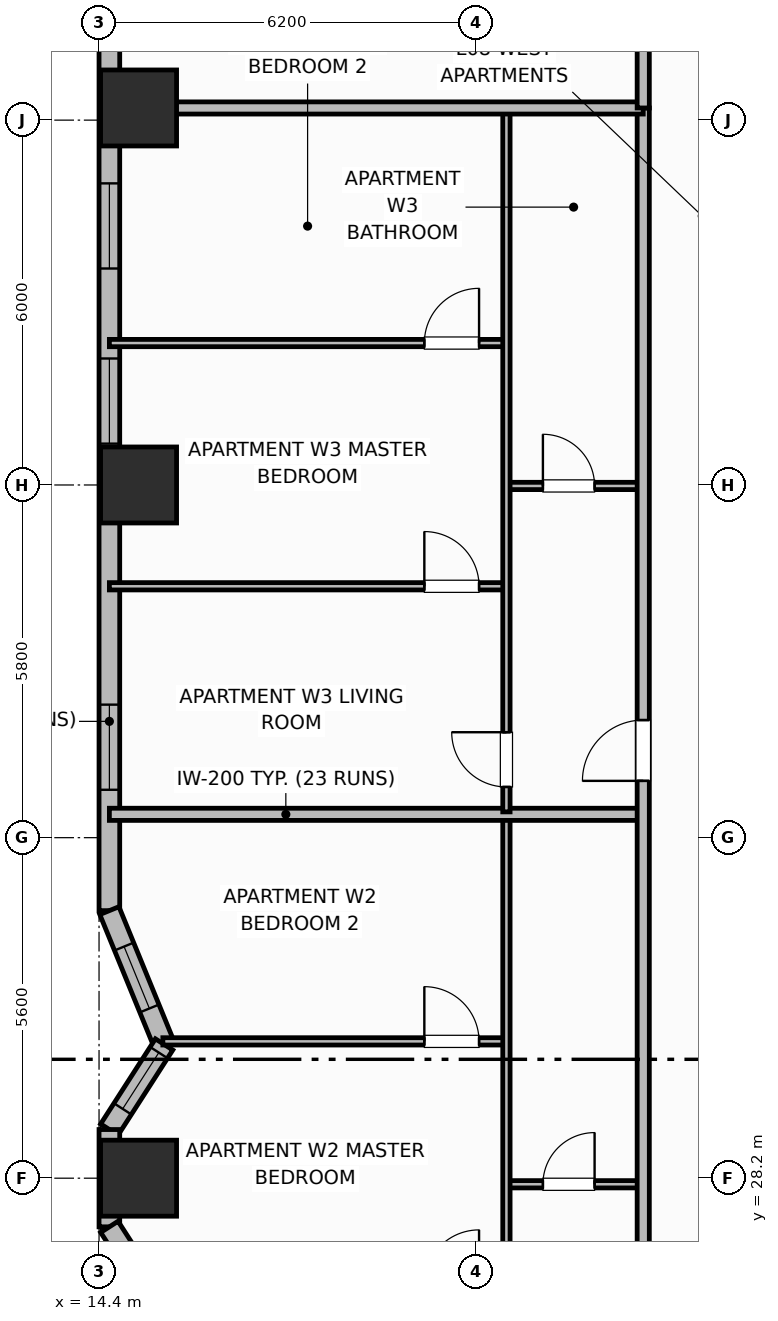
"""IFC4 building model, lengths in metres.
Left out: names, types, materials, properties, quantities, classifications, styles, units other than length and angle.
Written with IfcOpenShell. Run it as: python <this file> out.ifc"""

import sys

from ifc_helpers import new_model, si_unit, direction, frame, frame_2d, origin, origin_2d, place, context, subcontext, project, spatial, rectangle, extrude, element, fill, save


model = new_model("IFC4")
c1 = context("Model", 3, precision=1e-05, world=origin(), true_north=direction((0.0, 1.0)))
c2 = subcontext(c1, "Body", "Model", "MODEL_VIEW")
j1 = project(units=[si_unit("LENGTHUNIT", "METRE"), si_unit("PLANEANGLEUNIT", "RADIAN")], contexts=[c1])
p1 = place(None, origin())
s1 = spatial("IfcSite", under=j1, at=p1, CompositionType="ELEMENT")
p2 = place(p1, origin())
s2 = spatial("IfcBuilding", under=s1, at=p2, CompositionType="ELEMENT")
p3 = place(p2, frame((0.0, 0.0, 36.2)))
s3 = spatial("IfcBuildingStorey", under=s2, at=p3, CompositionType="ELEMENT", Elevation=36.2)
for number, where, z_axis, x_axis in (
    (1, (15.05, 28.2, 0.0), (0.0, 0.0, 1.0), (1.0, 0.0, 0.0)),
    (2, (15.05, 39.6, 0.0), (0.0, 0.0, 1.0), (1.0, 0.0, 0.0)),
    (3, (15.05, 45.8, 0.0), (0.0, 0.0, 1.0), (1.0, 0.0, 0.0)),
):
    element("IfcColumn", number, at=place(p3, frame(where, z_axis=z_axis, x_axis=x_axis)), inside=s3, PredefinedType="COLUMN", context=c2, shape_type="SweptSolid", body=[
        extrude(rectangle(XDim=1.25, YDim=1.25, at=origin_2d()), origin(), (0.0, 0.0, 1.0), 3.7),
    ])
p4 = place(p3, frame((14.57, 47.4, 0.0), z_axis=(0.0, 0.0, 1.0), x_axis=(0.0, -1.0, 0.0)))
e4 = element("IfcWall", 4, at=p4, inside=s3, PredefinedType="SOLIDWALL", context=c2, shape_type="SweptSolid", body=[
    extrude(rectangle(XDim=14.8, YDim=0.34, at=frame_2d((7.4, 0.0))), origin(), (0.0, 0.0, 1.0), 2.7),
])
p5 = place(p4, frame((2.84, 0.0, 0.69)))
e5 = element("IfcOpeningElement", 5, at=p5, cuts=e4, PredefinedType="OPENING", context=c2, shape_type="SweptSolid", body=[
    extrude(rectangle(XDim=1.4, YDim=1.85, at=frame_2d((0.7, 0.925))), frame((0.0, 0.18, 0.0), z_axis=(0.0, -1.0, 0.0), x_axis=(1.0, 0.0, 0.0)), (0.0, 0.0, 1.0), 0.36),
])
p6 = place(p4, frame((5.72, 0.0, 0.69)))
e6 = element("IfcOpeningElement", 6, at=p6, cuts=e4, PredefinedType="OPENING", context=c2, shape_type="SweptSolid", body=[
    extrude(rectangle(XDim=1.4, YDim=1.85, at=frame_2d((0.7, 0.925))), frame((0.0, 0.18, 0.0), z_axis=(0.0, -1.0, 0.0), x_axis=(1.0, 0.0, 0.0)), (0.0, 0.0, 1.0), 0.36),
])
p7 = place(p4, frame((11.413, 0.0, 0.73)))
e7 = element("IfcOpeningElement", 7, at=p7, cuts=e4, PredefinedType="OPENING", context=c2, shape_type="SweptSolid", body=[
    extrude(rectangle(XDim=1.4, YDim=1.85, at=frame_2d((0.7, 0.925))), frame((0.0, 0.18, 0.0), z_axis=(0.0, -1.0, 0.0), x_axis=(1.0, 0.0, 0.0)), (0.0, 0.0, 1.0), 0.36),
])
p8 = place(p3, frame((14.57, 32.6, 0.0), z_axis=(0.0, 0.0, 1.0), x_axis=(0.378568858991, -0.925573130013, 0.0)))
e8 = element("IfcWall", 8, at=p8, inside=s3, PredefinedType="SOLIDWALL", context=c2, shape_type="SweptSolid", body=[
    extrude(rectangle(XDim=2.377, YDim=0.34, at=frame_2d((1.188, 0.0))), origin(), (0.0, 0.0, 1.0), 2.7),
])
p9 = place(p8, frame((0.638, 0.0, 0.89)))
e9 = element("IfcOpeningElement", 9, at=p9, cuts=e8, PredefinedType="OPENING", context=c2, shape_type="SweptSolid", body=[
    extrude(rectangle(XDim=1.1, YDim=1.65, at=frame_2d((0.55, 0.825))), frame((0.0, 0.18, 0.0), z_axis=(0.0, -1.0, 0.0), x_axis=(1.0, 0.0, 0.0)), (0.0, 0.0, 1.0), 0.36),
])
p10 = place(p3, frame((15.47, 30.4, 0.0), z_axis=(0.0, 0.0, 1.0), x_axis=(-0.540742762169, -0.841188008214, 0.0)))
e10 = element("IfcWall", 10, at=p10, inside=s3, PredefinedType="SOLIDWALL", context=c2, shape_type="SweptSolid", body=[
    extrude(rectangle(XDim=1.664, YDim=0.34, at=frame_2d((0.832, 0.0))), origin(), (0.0, 0.0, 1.0), 2.7),
])
p11 = place(p10, frame((0.16, 0.0, 0.89)))
e11 = element("IfcOpeningElement", 11, at=p11, cuts=e10, PredefinedType="OPENING", context=c2, shape_type="SweptSolid", body=[
    extrude(rectangle(XDim=1.1, YDim=1.65, at=frame_2d((0.55, 0.825))), frame((0.0, 0.18, 0.0), z_axis=(0.0, -1.0, 0.0), x_axis=(1.0, 0.0, 0.0)), (0.0, 0.0, 1.0), 0.36),
])
p12 = place(p3, frame((14.57, 29.0, 0.0), z_axis=(0.0, 0.0, 1.0), x_axis=(0.0, -1.0, 0.0)))
e12 = element("IfcWall", 12, at=p12, inside=s3, PredefinedType="SOLIDWALL", context=c2, shape_type="SweptSolid", body=[
    extrude(rectangle(XDim=1.6, YDim=0.34, at=frame_2d((0.8, 0.0))), origin(), (0.0, 0.0, 1.0), 2.7),
])
p13 = place(p3, frame((14.57, 27.4, 0.0), z_axis=(0.0, 0.0, 1.0), x_axis=(0.540742762169, -0.841188008214, 0.0)))
e13 = element("IfcWall", 13, at=p13, inside=s3, PredefinedType="SOLIDWALL", context=c2, shape_type="SweptSolid", body=[
    extrude(rectangle(XDim=1.664, YDim=0.34, at=frame_2d((0.832, 0.0))), origin(), (0.0, 0.0, 1.0), 2.7),
])
p14 = place(p3, frame((21.1, 28.1, 0.0), z_axis=(0.0, 0.0, 1.0), x_axis=(1.0, 0.0, 0.0)))
e14 = element("IfcWall", 14, at=p14, inside=s3, PredefinedType="PARTITIONING", context=c2, shape_type="SweptSolid", body=[
    extrude(rectangle(XDim=2.25, YDim=0.12, at=frame_2d((1.125, 0.0))), origin(), (0.0, 0.0, 1.0), 2.53),
])
p15 = place(p14, frame((0.6, 0.0, 0.0)))
e15 = element("IfcOpeningElement", 15, at=p15, cuts=e14, PredefinedType="OPENING", context=c2, shape_type="SweptSolid", body=[
    extrude(rectangle(XDim=0.85, YDim=2.1, at=frame_2d((0.425, 1.05))), frame((0.0, 0.07, 0.0), z_axis=(0.0, -1.0, 0.0), x_axis=(1.0, 0.0, 0.0)), (0.0, 0.0, 1.0), 0.14),
])
p16 = place(p3, frame((15.449, 30.45, 0.0), z_axis=(0.0, 0.0, 1.0), x_axis=(1.0, 0.0, 0.0)))
e16 = element("IfcWall", 16, at=p16, inside=s3, PredefinedType="PARTITIONING", context=c2, shape_type="SweptSolid", body=[
    extrude(rectangle(XDim=5.651, YDim=0.12, at=frame_2d((2.825, 0.0))), origin(), (0.0, 0.0, 1.0), 2.53),
])
p17 = place(p16, frame((4.301, 0.0, 0.0)))
e17 = element("IfcOpeningElement", 17, at=p17, cuts=e16, PredefinedType="OPENING", context=c2, shape_type="SweptSolid", body=[
    extrude(rectangle(XDim=0.9, YDim=2.1, at=frame_2d((0.45, 1.05))), frame((0.0, 0.07, 0.0), z_axis=(0.0, -1.0, 0.0), x_axis=(1.0, 0.0, 0.0)), (0.0, 0.0, 1.0), 0.14),
])
p18 = place(p3, frame((21.1, 22.74, 0.0), z_axis=(0.0, 0.0, 1.0), x_axis=(0.0, 1.0, 0.0)))
e18 = element("IfcWall", 18, at=p18, inside=s3, PredefinedType="PARTITIONING", context=c2, shape_type="SweptSolid", body=[
    extrude(rectangle(XDim=11.404, YDim=0.12, at=frame_2d((5.702, 0.0))), origin(), (0.0, 0.0, 1.0), 2.53),
])
p19 = place(p18, frame((0.41, 0.0, 0.0)))
e19 = element("IfcOpeningElement", 19, at=p19, cuts=e18, PredefinedType="OPENING", context=c2, shape_type="SweptSolid", body=[
    extrude(rectangle(XDim=0.9, YDim=2.1, at=frame_2d((0.45, 1.05))), frame((0.0, 0.07, 0.0), z_axis=(0.0, -1.0, 0.0), x_axis=(1.0, 0.0, 0.0)), (0.0, 0.0, 1.0), 0.14),
])
p20 = place(p3, frame((14.57, 34.184, 0.0), z_axis=(0.0, 0.0, 1.0), x_axis=(1.0, 0.0, 0.0)))
e20 = element("IfcWall", 20, at=p20, inside=s3, PredefinedType="PARTITIONING", context=c2, shape_type="SweptSolid", body=[
    extrude(rectangle(XDim=8.78, YDim=0.2, at=frame_2d((4.39, 0.0))), origin(), (0.0, 0.0, 1.0), 2.53),
])
p21 = place(p3, frame((21.1, 39.584, 0.0), z_axis=(0.0, 0.0, 1.0), x_axis=(1.0, 0.0, 0.0)))
e21 = element("IfcWall", 21, at=p21, inside=s3, PredefinedType="PARTITIONING", context=c2, shape_type="SweptSolid", body=[
    extrude(rectangle(XDim=2.25, YDim=0.12, at=frame_2d((1.125, 0.0))), origin(), (0.0, 0.0, 1.0), 2.53),
])
p22 = place(p21, frame((0.6, 0.0, 0.0)))
e22 = element("IfcOpeningElement", 22, at=p22, cuts=e21, PredefinedType="OPENING", context=c2, shape_type="SweptSolid", body=[
    extrude(rectangle(XDim=0.85, YDim=2.1, at=frame_2d((0.425, 1.05))), frame((0.0, 0.07, 0.0), z_axis=(0.0, -1.0, 0.0), x_axis=(1.0, 0.0, 0.0)), (0.0, 0.0, 1.0), 0.14),
])
p23 = place(p3, frame((14.57, 37.934, 0.0), z_axis=(0.0, 0.0, 1.0), x_axis=(1.0, 0.0, 0.0)))
e23 = element("IfcWall", 23, at=p23, inside=s3, PredefinedType="PARTITIONING", context=c2, shape_type="SweptSolid", body=[
    extrude(rectangle(XDim=6.53, YDim=0.12, at=frame_2d((3.265, 0.0))), origin(), (0.0, 0.0, 1.0), 2.53),
])
p24 = place(p23, frame((5.18, 0.0, 0.0)))
e24 = element("IfcOpeningElement", 24, at=p24, cuts=e23, PredefinedType="OPENING", context=c2, shape_type="SweptSolid", body=[
    extrude(rectangle(XDim=0.9, YDim=2.1, at=frame_2d((0.45, 1.05))), frame((0.0, 0.07, 0.0), z_axis=(0.0, -1.0, 0.0), x_axis=(1.0, 0.0, 0.0)), (0.0, 0.0, 1.0), 0.14),
])
p25 = place(p3, frame((14.57, 41.934, 0.0), z_axis=(0.0, 0.0, 1.0), x_axis=(1.0, 0.0, 0.0)))
e25 = element("IfcWall", 25, at=p25, inside=s3, PredefinedType="PARTITIONING", context=c2, shape_type="SweptSolid", body=[
    extrude(rectangle(XDim=6.53, YDim=0.12, at=frame_2d((3.265, 0.0))), origin(), (0.0, 0.0, 1.0), 2.53),
])
p26 = place(p25, frame((5.18, 0.0, 0.0)))
e26 = element("IfcOpeningElement", 26, at=p26, cuts=e25, PredefinedType="OPENING", context=c2, shape_type="SweptSolid", body=[
    extrude(rectangle(XDim=0.9, YDim=2.1, at=frame_2d((0.45, 1.05))), frame((0.0, 0.07, 0.0), z_axis=(0.0, -1.0, 0.0), x_axis=(1.0, 0.0, 0.0)), (0.0, 0.0, 1.0), 0.14),
])
p27 = place(p3, frame((21.1, 34.224, 0.0), z_axis=(0.0, 0.0, 1.0), x_axis=(0.0, 1.0, 0.0)))
e27 = element("IfcWall", 27, at=p27, inside=s3, PredefinedType="PARTITIONING", context=c2, shape_type="SweptSolid", body=[
    extrude(rectangle(XDim=11.536, YDim=0.12, at=frame_2d((5.768, 0.0))), origin(), (0.0, 0.0, 1.0), 2.53),
])
p28 = place(p27, frame((0.41, 0.0, 0.0)))
e28 = element("IfcOpeningElement", 28, at=p28, cuts=e27, PredefinedType="OPENING", context=c2, shape_type="SweptSolid", body=[
    extrude(rectangle(XDim=0.9, YDim=2.1, at=frame_2d((0.45, 1.05))), frame((0.0, 0.07, 0.0), z_axis=(0.0, -1.0, 0.0), x_axis=(1.0, 0.0, 0.0)), (0.0, 0.0, 1.0), 0.14),
])
p29 = place(p3, frame((23.35, 10.6, 0.0), z_axis=(0.0, 0.0, 1.0), x_axis=(0.0, 1.0, 0.0)))
e29 = element("IfcWall", 29, at=p29, inside=s3, PredefinedType="PARTITIONING", context=c2, shape_type="SweptSolid", body=[
    extrude(rectangle(XDim=35.2, YDim=0.2, at=frame_2d((17.6, 0.0))), origin(), (0.0, 0.0, 1.0), 2.53),
])
p30 = place(p29, frame((2.65, 0.0, 0.0)))
e30 = element("IfcOpeningElement", 30, at=p30, cuts=e29, PredefinedType="OPENING", context=c2, shape_type="SweptSolid", body=[
    extrude(rectangle(XDim=1.0, YDim=2.15, at=frame_2d((0.5, 1.075))), frame((0.0, 0.11, 0.0), z_axis=(0.0, -1.0, 0.0), x_axis=(1.0, 0.0, 0.0)), (0.0, 0.0, 1.0), 0.22),
])
p31 = place(p29, frame((12.65, 0.0, 0.0)))
e31 = element("IfcOpeningElement", 31, at=p31, cuts=e29, PredefinedType="OPENING", context=c2, shape_type="SweptSolid", body=[
    extrude(rectangle(XDim=1.0, YDim=2.15, at=frame_2d((0.5, 1.075))), frame((0.0, 0.11, 0.0), z_axis=(0.0, -1.0, 0.0), x_axis=(1.0, 0.0, 0.0)), (0.0, 0.0, 1.0), 0.22),
])
p32 = place(p29, frame((24.134, 0.0, 0.0)))
e32 = element("IfcOpeningElement", 32, at=p32, cuts=e29, PredefinedType="OPENING", context=c2, shape_type="SweptSolid", body=[
    extrude(rectangle(XDim=1.0, YDim=2.15, at=frame_2d((0.5, 1.075))), frame((0.0, 0.11, 0.0), z_axis=(0.0, -1.0, 0.0), x_axis=(1.0, 0.0, 0.0)), (0.0, 0.0, 1.0), 0.22),
])
p33 = place(p3, frame((14.99, 45.8, 0.0), z_axis=(0.0, 0.0, 1.0), x_axis=(1.0, 0.0, 0.0)))
e33 = element("IfcWall", 33, at=p33, inside=s3, PredefinedType="PARTITIONING", context=c2, shape_type="SweptSolid", body=[
    extrude(rectangle(XDim=8.36, YDim=0.2, at=frame_2d((4.18, 0.0))), origin(), (0.0, 0.0, 1.0), 2.53),
])
p34 = place(p3, frame((23.35, 45.8, 0.0), z_axis=(0.0, 0.0, 1.0), x_axis=(0.0, 1.0, 0.0)))
e34 = element("IfcWall", 34, at=p34, inside=s3, PredefinedType="PARTITIONING", context=c2, shape_type="SweptSolid", body=[
    extrude(rectangle(XDim=5.63, YDim=0.2, at=frame_2d((2.815, 0.0))), origin(), (0.0, 0.0, 1.0), 2.53),
])
p35 = place(p5, origin())
e35 = element("IfcWindow", 35, at=p35, inside=s3, PartitioningType="SINGLE_PANEL", PredefinedType="WINDOW", context=c2, shape_type="SweptSolid", body=[
    extrude(rectangle(XDim=1.4, YDim=1.85, at=frame_2d((0.7, 0.925))), frame((0.0, 0.03, 0.0), z_axis=(0.0, -1.0, 0.0), x_axis=(1.0, 0.0, 0.0)), (0.0, 0.0, 1.0), 0.06),
])
fill(e5, e35)
p36 = place(p6, origin())
e36 = element("IfcWindow", 36, at=p36, inside=s3, PartitioningType="SINGLE_PANEL", PredefinedType="WINDOW", context=c2, shape_type="SweptSolid", body=[
    extrude(rectangle(XDim=1.4, YDim=1.85, at=frame_2d((0.7, 0.925))), frame((0.0, 0.03, 0.0), z_axis=(0.0, -1.0, 0.0), x_axis=(1.0, 0.0, 0.0)), (0.0, 0.0, 1.0), 0.06),
])
fill(e6, e36)
p37 = place(p7, origin())
e37 = element("IfcWindow", 37, at=p37, inside=s3, PartitioningType="SINGLE_PANEL", PredefinedType="WINDOW", context=c2, shape_type="SweptSolid", body=[
    extrude(rectangle(XDim=1.4, YDim=1.85, at=frame_2d((0.7, 0.925))), frame((0.0, 0.03, 0.0), z_axis=(0.0, -1.0, 0.0), x_axis=(1.0, 0.0, 0.0)), (0.0, 0.0, 1.0), 0.06),
])
fill(e7, e37)
p38 = place(p9, origin())
e38 = element("IfcWindow", 38, at=p38, inside=s3, PartitioningType="SINGLE_PANEL", PredefinedType="WINDOW", context=c2, shape_type="SweptSolid", body=[
    extrude(rectangle(XDim=1.1, YDim=1.65, at=frame_2d((0.55, 0.825))), frame((0.0, 0.03, 0.0), z_axis=(0.0, -1.0, 0.0), x_axis=(1.0, 0.0, 0.0)), (0.0, 0.0, 1.0), 0.06),
])
fill(e9, e38)
p39 = place(p11, origin())
e39 = element("IfcWindow", 39, at=p39, inside=s3, PartitioningType="SINGLE_PANEL", PredefinedType="WINDOW", context=c2, shape_type="SweptSolid", body=[
    extrude(rectangle(XDim=1.1, YDim=1.65, at=frame_2d((0.55, 0.825))), frame((0.0, 0.03, 0.0), z_axis=(0.0, -1.0, 0.0), x_axis=(1.0, 0.0, 0.0)), (0.0, 0.0, 1.0), 0.06),
])
fill(e11, e39)
p40 = place(p15, origin())
e40 = element("IfcDoor", 40, at=p40, inside=s3, OperationType="SINGLE_SWING_RIGHT", PredefinedType="DOOR", context=c2, shape_type="SweptSolid", body=[
    extrude(rectangle(XDim=0.85, YDim=2.1, at=frame_2d((0.425, 1.05))), frame((0.0, 0.025, 0.0), z_axis=(0.0, -1.0, 0.0), x_axis=(1.0, 0.0, 0.0)), (0.0, 0.0, 1.0), 0.05),
])
fill(e15, e40)
p41 = place(p17, origin())
e41 = element("IfcDoor", 41, at=p41, inside=s3, OperationType="SINGLE_SWING_LEFT", PredefinedType="DOOR", context=c2, shape_type="SweptSolid", body=[
    extrude(rectangle(XDim=0.9, YDim=2.1, at=frame_2d((0.45, 1.05))), frame((0.0, 0.025, 0.0), z_axis=(0.0, -1.0, 0.0), x_axis=(1.0, 0.0, 0.0)), (0.0, 0.0, 1.0), 0.05),
])
fill(e17, e41)
p42 = place(p22, origin())
e42 = element("IfcDoor", 42, at=p42, inside=s3, OperationType="SINGLE_SWING_LEFT", PredefinedType="DOOR", context=c2, shape_type="SweptSolid", body=[
    extrude(rectangle(XDim=0.85, YDim=2.1, at=frame_2d((0.425, 1.05))), frame((0.0, 0.025, 0.0), z_axis=(0.0, -1.0, 0.0), x_axis=(1.0, 0.0, 0.0)), (0.0, 0.0, 1.0), 0.05),
])
fill(e22, e42)
p43 = place(p24, origin())
e43 = element("IfcDoor", 43, at=p43, inside=s3, OperationType="SINGLE_SWING_LEFT", PredefinedType="DOOR", context=c2, shape_type="SweptSolid", body=[
    extrude(rectangle(XDim=0.9, YDim=2.1, at=frame_2d((0.45, 1.05))), frame((0.0, 0.025, 0.0), z_axis=(0.0, -1.0, 0.0), x_axis=(1.0, 0.0, 0.0)), (0.0, 0.0, 1.0), 0.05),
])
fill(e24, e43)
p44 = place(p26, origin())
e44 = element("IfcDoor", 44, at=p44, inside=s3, OperationType="SINGLE_SWING_RIGHT", PredefinedType="DOOR", context=c2, shape_type="SweptSolid", body=[
    extrude(rectangle(XDim=0.9, YDim=2.1, at=frame_2d((0.45, 1.05))), frame((0.0, 0.025, 0.0), z_axis=(0.0, -1.0, 0.0), x_axis=(1.0, 0.0, 0.0)), (0.0, 0.0, 1.0), 0.05),
])
fill(e26, e44)
p45 = place(p28, origin())
e45 = element("IfcDoor", 45, at=p45, inside=s3, OperationType="SINGLE_SWING_RIGHT", PredefinedType="DOOR", context=c2, shape_type="SweptSolid", body=[
    extrude(rectangle(XDim=0.9, YDim=2.1, at=frame_2d((0.45, 1.05))), frame((0.0, 0.025, 0.0), z_axis=(0.0, -1.0, 0.0), x_axis=(1.0, 0.0, 0.0)), (0.0, 0.0, 1.0), 0.05),
])
fill(e28, e45)
p46 = place(p32, origin())
e46 = element("IfcDoor", 46, at=p46, inside=s3, OperationType="SINGLE_SWING_LEFT", PredefinedType="DOOR", context=c2, shape_type="SweptSolid", body=[
    extrude(rectangle(XDim=1.0, YDim=2.15, at=frame_2d((0.5, 1.075))), frame((0.0, 0.025, 0.0), z_axis=(0.0, -1.0, 0.0), x_axis=(1.0, 0.0, 0.0)), (0.0, 0.0, 1.0), 0.05),
])
fill(e32, e46)
save(model, sys.argv[1])
